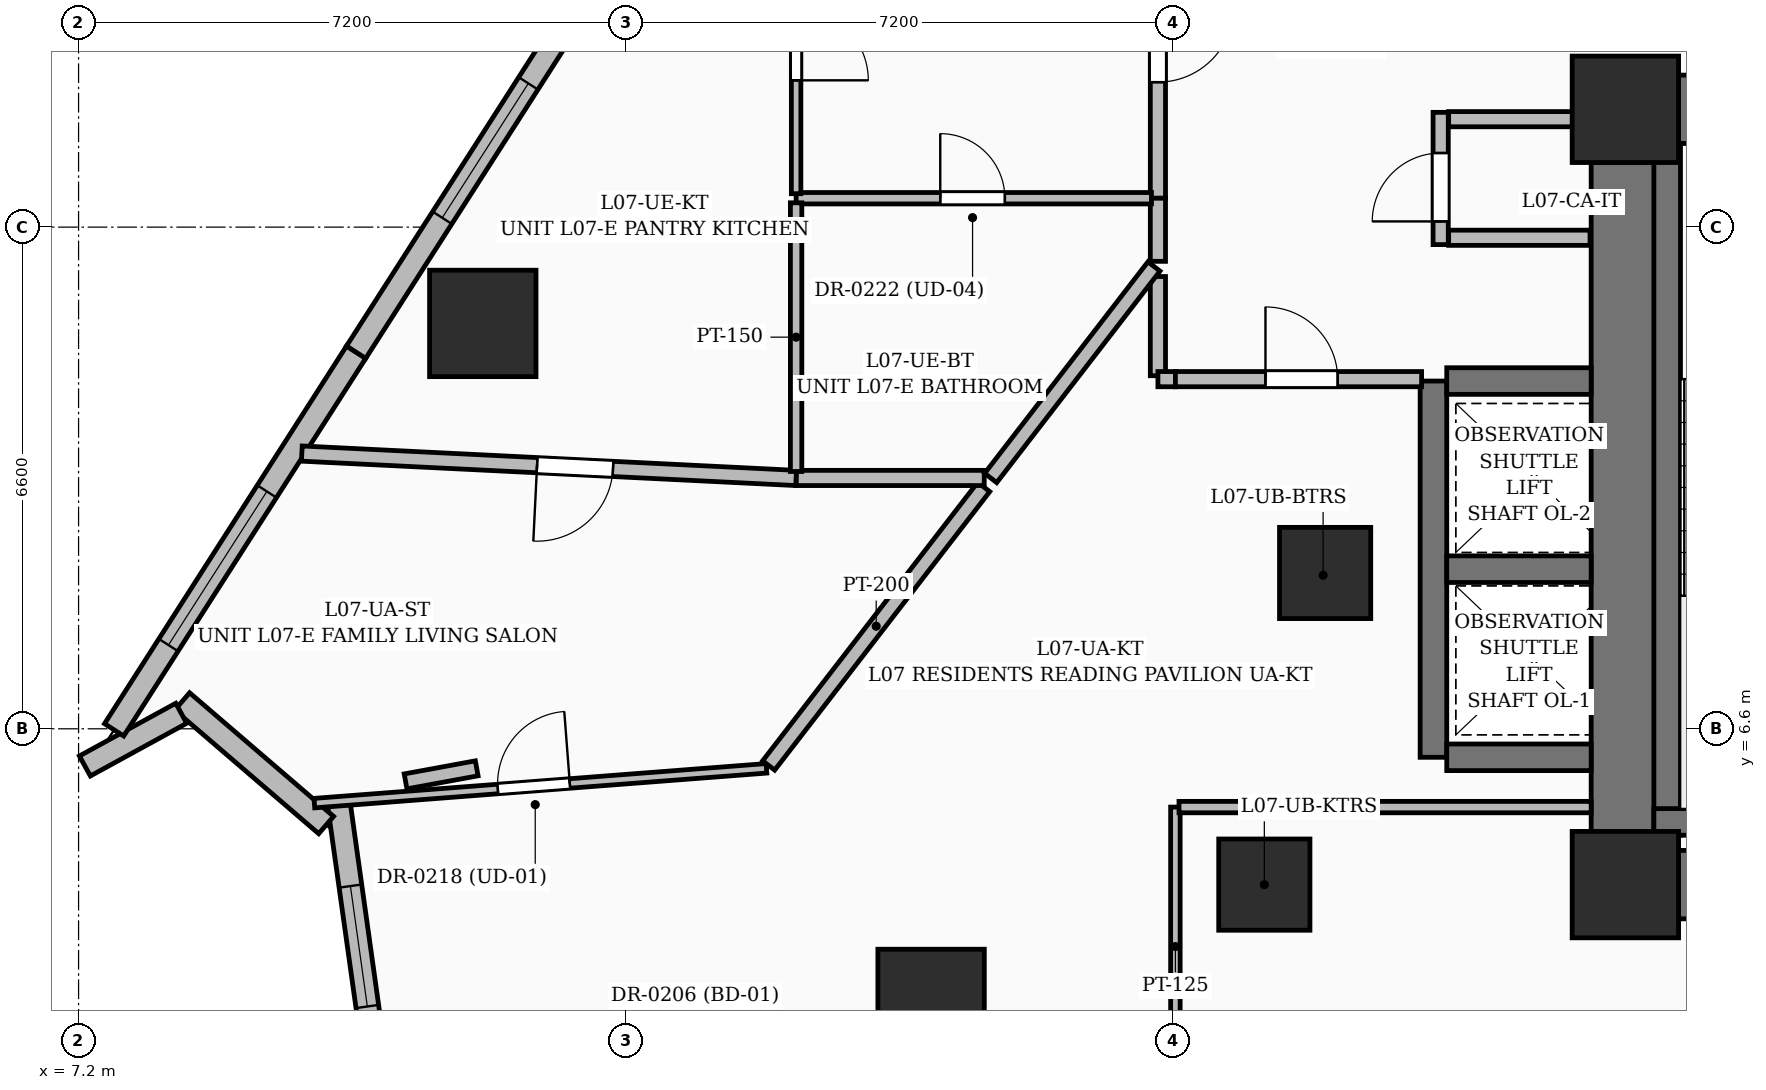
"""IFC4 building model, lengths in metres.
Left out: names, types, materials, properties, quantities, classifications, styles, units other than length and angle.
Written with IfcOpenShell. Run it as: python <this file> out.ifc"""

import sys

from ifc_helpers import new_model, si_unit, direction, frame, frame_2d, origin, origin_2d, place, context, subcontext, project, spatial, rectangle, extrude, element, fill, save


model = new_model("IFC4")
c1 = context("Model", 3, precision=1e-05, world=origin(), true_north=direction((0.0, 1.0)))
c2 = subcontext(c1, "Body", "Model", "MODEL_VIEW")
j1 = project(units=[si_unit("LENGTHUNIT", "METRE"), si_unit("PLANEANGLEUNIT", "RADIAN")], contexts=[c1])
p1 = place(None, origin())
s1 = spatial("IfcSite", under=j1, at=p1, CompositionType="ELEMENT")
p2 = place(p1, origin())
s2 = spatial("IfcBuilding", under=s1, at=p2, CompositionType="ELEMENT")
p3 = place(p2, frame((0.0, 0.0, 35.4)))
s3 = spatial("IfcBuildingStorey", under=s2, at=p3, CompositionType="ELEMENT", Elevation=35.4)
for number, where, z_axis, x_axis in (
    (1, (27.55, 4.55, 0.0), (0.0, 0.0, 1.0), (1.0, 0.0, 0.0)),
    (2, (27.55, 14.75, 0.0), (0.0, 0.0, 1.0), (1.0, 0.0, 0.0)),
):
    element("IfcColumn", number, at=place(p3, frame(where, z_axis=z_axis, x_axis=x_axis)), inside=s3, PredefinedType="COLUMN", context=c2, shape_type="SweptSolid", body=[
        extrude(rectangle(XDim=1.4, YDim=1.4, at=origin_2d()), origin(), (0.0, 0.0, 1.0), 3.6),
    ])
for number, where, z_axis, x_axis in (
    (3, (22.8, 4.55, 0.0), (0.0, 0.0, 1.0), (1.0, 0.0, 0.0)),
    (4, (23.6, 8.65, 0.0), (0.0, 0.0, 1.0), (1.0, 0.0, 0.0)),
):
    element("IfcColumn", number, at=place(p3, frame(where, z_axis=z_axis, x_axis=x_axis)), inside=s3, PredefinedType="COLUMN", context=c2, shape_type="SweptSolid", body=[
        extrude(rectangle(XDim=1.2, YDim=1.2, at=origin_2d()), origin(), (0.0, 0.0, 1.0), 3.6),
    ])
p4 = place(p3, frame((28.25, 4.55, 0.0), z_axis=(0.0, 0.0, 1.0), x_axis=(1.0, 0.0, 0.0)))
e5 = element("IfcWall", 5, at=p4, inside=s3, PredefinedType="SHEAR", context=c2, shape_type="SweptSolid", body=[
    extrude(rectangle(XDim=6.2, YDim=0.9, at=frame_2d((3.1, 0.0))), origin(), (0.0, 0.0, 1.0), 3.6),
])
p5 = place(p3, frame((28.25, 14.75, 0.0), z_axis=(0.0, 0.0, 1.0), x_axis=(1.0, 0.0, 0.0)))
e6 = element("IfcWall", 6, at=p5, inside=s3, PredefinedType="SHEAR", context=c2, shape_type="SweptSolid", body=[
    extrude(rectangle(XDim=6.2, YDim=0.9, at=frame_2d((3.1, 0.0))), origin(), (0.0, 0.0, 1.0), 3.6),
])
p6 = place(p5, frame((0.925, 0.0, 0.0)))
e7 = element("IfcOpeningElement", 7, at=p6, cuts=e6, PredefinedType="OPENING", context=c2, shape_type="SweptSolid", body=[
    extrude(rectangle(XDim=1.05, YDim=2.15, at=frame_2d((0.525, 1.075))), frame((0.0, 0.46, 0.0), z_axis=(0.0, -1.0, 0.0), x_axis=(1.0, 0.0, 0.0)), (0.0, 0.0, 1.0), 0.92),
])
p7 = place(p3, frame((27.55, 5.25, 0.0), z_axis=(0.0, 0.0, 1.0), x_axis=(0.0, 1.0, 0.0)))
e8 = element("IfcWall", 8, at=p7, inside=s3, PredefinedType="SHEAR", context=c2, shape_type="SweptSolid", body=[
    extrude(rectangle(XDim=8.8, YDim=0.9, at=frame_2d((4.4, 0.0))), origin(), (0.0, 0.0, 1.0), 3.6),
])
p8 = place(p3, frame((28.1, 5.2, 0.0), z_axis=(0.0, 0.0, 1.0), x_axis=(0.0, 1.0, 0.0)))
e9 = element("IfcWall", 9, at=p8, inside=s3, PredefinedType="SOLIDWALL", context=c2, shape_type="SweptSolid", body=[
    extrude(rectangle(XDim=9.1, YDim=0.35, at=frame_2d((4.55, 0.0))), origin(), (0.0, 0.0, 1.0), 3.6),
])
p9 = place(p3, frame((27.925, 5.375, 0.0), z_axis=(0.0, 0.0, 1.0), x_axis=(1.0, 0.0, 0.0)))
e10 = element("IfcWall", 10, at=p9, inside=s3, PredefinedType="SOLIDWALL", context=c2, shape_type="SweptSolid", body=[
    extrude(rectangle(XDim=3.55, YDim=0.35, at=frame_2d((1.775, 0.0))), origin(), (0.0, 0.0, 1.0), 3.6),
])
p10 = place(p3, frame((25.025, 6.225, 0.0), z_axis=(0.0, 0.0, 1.0), x_axis=(0.0, 1.0, 0.0)))
e11 = element("IfcWall", 11, at=p10, inside=s3, PredefinedType="SOLIDWALL", context=c2, shape_type="SweptSolid", body=[
    extrude(rectangle(XDim=4.95, YDim=0.35, at=frame_2d((2.475, 0.0))), origin(), (0.0, 0.0, 1.0), 3.6),
])
for number, where, z_axis, x_axis in (
    (12, (25.2, 6.225, 0.0), (0.0, 0.0, 1.0), (1.0, 0.0, 0.0)),
    (13, (25.2, 8.7, 0.0), (0.0, 0.0, 1.0), (1.0, 0.0, 0.0)),
    (14, (25.2, 11.175, 0.0), (0.0, 0.0, 1.0), (1.0, 0.0, 0.0)),
):
    element("IfcWall", number, at=place(p3, frame(where, z_axis=z_axis, x_axis=x_axis)), inside=s3, PredefinedType="SOLIDWALL", context=c2, shape_type="SweptSolid", body=[
        extrude(rectangle(XDim=1.9, YDim=0.35, at=frame_2d((0.95, 0.0))), origin(), (0.0, 0.0, 1.0), 3.6),
    ])
for number, where, z_axis, x_axis in (
    (15, (18.416, 3.0, 0.0), (0.0, 0.0, 1.0), (1.0, 0.0, 0.0)),
    (16, (12.518, 11.933, 0.0), (0.0, 0.0, 1.0), (1.0, 0.0, 0.0)),
):
    element("IfcColumn", number, at=place(p3, frame(where, z_axis=z_axis, x_axis=x_axis)), inside=s3, PredefinedType="COLUMN", context=c2, shape_type="SweptSolid", body=[
        extrude(rectangle(XDim=1.4, YDim=1.4, at=origin_2d()), origin(), (0.0, 0.0, 1.0), 3.6),
    ])
p11 = place(p3, frame((11.044, 2.625, 0.0), z_axis=(0.0, 0.0, 1.0), x_axis=(-0.139123594989, 0.99027502509, 0.0)))
e17 = element("IfcWall", 17, at=p11, inside=s3, PredefinedType="SOLIDWALL", context=c2, shape_type="SweptSolid", body=[
    extrude(rectangle(XDim=3.05, YDim=0.3, at=frame_2d((1.525, 0.0))), origin(), (0.0, 0.0, 1.0), 3.35),
])
p12 = place(p11, frame((0.325, 0.0, 0.55)))
e18 = element("IfcOpeningElement", 18, at=p12, cuts=e17, PredefinedType="OPENING", context=c2, shape_type="SweptSolid", body=[
    extrude(rectangle(XDim=1.6, YDim=2.2, at=frame_2d((0.8, 1.1))), frame((0.0, 0.16, 0.0), z_axis=(0.0, -1.0, 0.0), x_axis=(1.0, 0.0, 0.0)), (0.0, 0.0, 1.0), 0.32),
])
p13 = place(p3, frame((10.457, 5.334, 0.0), z_axis=(0.0, 0.0, 1.0), x_axis=(-0.758710972352, 0.651427402273, 0.0)))
e19 = element("IfcWall", 19, at=p13, inside=s3, PredefinedType="SOLIDWALL", context=c2, shape_type="SweptSolid", body=[
    extrude(rectangle(XDim=2.496, YDim=0.3, at=frame_2d((1.248, 0.0))), origin(), (0.0, 0.0, 1.0), 3.35),
])
p14 = place(p3, frame((8.551, 6.804, 0.0), z_axis=(0.0, 0.0, 1.0), x_axis=(-0.877287752989, -0.479964788767, 0.0)))
e20 = element("IfcWall", 20, at=p14, inside=s3, PredefinedType="SOLIDWALL", context=c2, shape_type="SweptSolid", body=[
    extrude(rectangle(XDim=1.445, YDim=0.3, at=frame_2d((0.722, 0.0))), origin(), (0.0, 0.0, 1.0), 3.35),
])
p15 = place(p3, frame((7.668, 6.586, 0.0), z_axis=(0.0, 0.0, 1.0), x_axis=(0.539504449159, 0.841982748836, 0.0)))
e21 = element("IfcWall", 21, at=p15, inside=s3, PredefinedType="SOLIDWALL", context=c2, shape_type="SweptSolid", body=[
    extrude(rectangle(XDim=5.901, YDim=0.3, at=frame_2d((2.95, 0.0))), origin(), (0.0, 0.0, 1.0), 3.35),
])
p16 = place(p15, frame((1.325, 0.0, 0.6)))
e22 = element("IfcOpeningElement", 22, at=p16, cuts=e21, PredefinedType="OPENING", context=c2, shape_type="SweptSolid", body=[
    extrude(rectangle(XDim=2.4, YDim=2.1, at=frame_2d((1.2, 1.05))), frame((0.0, 0.16, 0.0), z_axis=(0.0, -1.0, 0.0), x_axis=(1.0, 0.0, 0.0)), (0.0, 0.0, 1.0), 0.32),
])
p17 = place(p3, frame((10.851, 11.555, 0.0), z_axis=(0.0, 0.0, 1.0), x_axis=(0.539526045631, 0.841968910403, 0.0)))
e23 = element("IfcWall", 23, at=p17, inside=s3, PredefinedType="SOLIDWALL", context=c2, shape_type="SweptSolid", body=[
    extrude(rectangle(XDim=6.526, YDim=0.3, at=frame_2d((3.263, 0.0))), origin(), (0.0, 0.0, 1.0), 3.35),
])
p18 = place(p17, frame((2.1, 0.0, 0.55)))
e24 = element("IfcOpeningElement", 24, at=p18, cuts=e23, PredefinedType="OPENING", context=c2, shape_type="SweptSolid", body=[
    extrude(rectangle(XDim=2.1, YDim=2.4, at=frame_2d((1.05, 1.2))), frame((0.0, 0.16, 0.0), z_axis=(0.0, -1.0, 0.0), x_axis=(1.0, 0.0, 0.0)), (0.0, 0.0, 1.0), 0.32),
])
p19 = place(p3, frame((25.12, 12.97, 0.0), z_axis=(0.0, 0.0, 1.0), x_axis=(0.0, 1.0, 0.0)))
e25 = element("IfcWall", 25, at=p19, inside=s3, PredefinedType="PARTITIONING", context=c2, shape_type="SweptSolid", body=[
    extrude(rectangle(XDim=1.74, YDim=0.2, at=frame_2d((0.87, 0.0))), origin(), (0.0, 0.0, 1.0), 3.35),
])
p20 = place(p19, frame((0.305, 0.0, 0.0)))
e26 = element("IfcOpeningElement", 26, at=p20, cuts=e25, PredefinedType="OPENING", context=c2, shape_type="SweptSolid", body=[
    extrude(rectangle(XDim=0.9, YDim=2.1, at=frame_2d((0.45, 1.05))), frame((0.0, 0.11, 0.0), z_axis=(0.0, -1.0, 0.0), x_axis=(1.0, 0.0, 0.0)), (0.0, 0.0, 1.0), 0.22),
])
for number, where, z_axis, x_axis in (
    (27, (25.225, 14.62, 0.0), (0.0, 0.0, 1.0), (1.0, 0.0, 0.0)),
    (28, (25.225, 13.06, 0.0), (0.0, 0.0, 1.0), (1.0, 0.0, 0.0)),
):
    element("IfcWall", number, at=place(p3, frame(where, z_axis=z_axis, x_axis=x_axis)), inside=s3, PredefinedType="PARTITIONING", context=c2, shape_type="SweptSolid", body=[
        extrude(rectangle(XDim=1.86, YDim=0.2, at=frame_2d((0.93, 0.0))), origin(), (0.0, 0.0, 1.0), 3.35),
    ])
p21 = place(p3, frame((21.4, 12.55, 0.0), z_axis=(0.0, 0.0, 1.0), x_axis=(0.0, -1.0, 0.0)))
e29 = element("IfcWall", 29, at=p21, inside=s3, PredefinedType="PARTITIONING", context=c2, shape_type="SweptSolid", body=[
    extrude(rectangle(XDim=1.305, YDim=0.2, at=frame_2d((0.652, 0.0))), origin(), (0.0, 0.0, 1.0), 3.35),
])
p22 = place(p3, frame((21.4, 11.2, 0.0), z_axis=(0.0, 0.0, 1.0), x_axis=(1.0, 0.0, 0.0)))
e30 = element("IfcWall", 30, at=p22, inside=s3, PredefinedType="PARTITIONING", context=c2, shape_type="SweptSolid", body=[
    extrude(rectangle(XDim=0.23, YDim=0.2, at=frame_2d((0.115, 0.0))), origin(), (0.0, 0.0, 1.0), 2.712),
])
p23 = place(p3, frame((21.63, 11.2, 0.0), z_axis=(0.0, 0.0, 1.0), x_axis=(1.0, 0.0, 0.0)))
e31 = element("IfcWall", 31, at=p23, inside=s3, PredefinedType="PARTITIONING", context=c2, shape_type="SweptSolid", body=[
    extrude(rectangle(XDim=3.239, YDim=0.2, at=frame_2d((1.62, 0.0))), origin(), (0.0, 0.0, 1.0), 2.712),
])
p24 = place(p23, frame((1.185, 0.0, 0.0)))
e32 = element("IfcOpeningElement", 32, at=p24, cuts=e31, PredefinedType="OPENING", context=c2, shape_type="SweptSolid", body=[
    extrude(rectangle(XDim=0.95, YDim=2.2, at=frame_2d((0.475, 1.1))), frame((0.0, 0.11, 0.0), z_axis=(0.0, -1.0, 0.0), x_axis=(1.0, 0.0, 0.0)), (0.0, 0.0, 1.0), 0.22),
])
p25 = place(p3, frame((21.4, 17.75, 0.0), z_axis=(0.0, 0.0, 1.0), x_axis=(0.0, -1.0, 0.0)))
e33 = element("IfcWall", 33, at=p25, inside=s3, PredefinedType="PARTITIONING", context=c2, shape_type="SweptSolid", body=[
    extrude(rectangle(XDim=4.17, YDim=0.2, at=frame_2d((2.085, 0.0))), origin(), (0.0, 0.0, 1.0), 2.712),
])
p26 = place(p25, frame((1.643, 0.0, 0.0)))
e34 = element("IfcOpeningElement", 34, at=p26, cuts=e33, PredefinedType="OPENING", context=c2, shape_type="SweptSolid", body=[
    extrude(rectangle(XDim=1.0, YDim=2.2, at=frame_2d((0.5, 1.1))), frame((0.0, 0.11, 0.0), z_axis=(0.0, -1.0, 0.0), x_axis=(1.0, 0.0, 0.0)), (0.0, 0.0, 1.0), 0.22),
])
p27 = place(p3, frame((21.4, 13.58, 0.0), z_axis=(0.0, 0.0, 1.0), x_axis=(0.0, -1.0, 0.0)))
e35 = element("IfcWall", 35, at=p27, inside=s3, PredefinedType="PARTITIONING", context=c2, shape_type="SweptSolid", body=[
    extrude(rectangle(XDim=0.83, YDim=0.2, at=frame_2d((0.415, 0.0))), origin(), (0.0, 0.0, 1.0), 3.35),
])
p28 = place(p3, frame((10.302, 5.622, 0.0), z_axis=(0.0, 0.0, 1.0), x_axis=(0.997048464094, 0.076774737046, 0.0)))
e36 = element("IfcWall", 36, at=p28, inside=s3, PredefinedType="PARTITIONING", context=c2, shape_type="SweptSolid", body=[
    extrude(rectangle(XDim=5.966, YDim=0.125, at=frame_2d((2.983, 0.0))), origin(), (0.0, 0.0, 1.0), 2.37),
])
p29 = place(p28, frame((2.421, 0.0, 0.0)))
e37 = element("IfcOpeningElement", 37, at=p29, cuts=e36, PredefinedType="OPENING", context=c2, shape_type="SweptSolid", body=[
    extrude(rectangle(XDim=0.95, YDim=2.2, at=frame_2d((0.475, 1.1))), frame((0.0, 0.072, 0.0), z_axis=(0.0, -1.0, 0.0), x_axis=(1.0, 0.0, 0.0)), (0.0, 0.0, 1.0), 0.145),
])
p30 = place(p3, frame((16.279, 6.118, 0.0), z_axis=(0.0, 0.0, 1.0), x_axis=(0.611231323246, 0.791452000745, 0.0)))
e38 = element("IfcWall", 38, at=p30, inside=s3, PredefinedType="PARTITIONING", context=c2, shape_type="SweptSolid", body=[
    extrude(rectangle(XDim=4.629, YDim=0.2, at=frame_2d((2.314, 0.0))), origin(), (0.0, 0.0, 1.0), 2.228),
])
p31 = place(p3, frame((19.115, 9.9, 0.0), z_axis=(0.0, 0.0, 1.0), x_axis=(-1.0, 0.0, 0.0)))
e39 = element("IfcWall", 39, at=p31, inside=s3, PredefinedType="PARTITIONING", context=c2, shape_type="SweptSolid", body=[
    extrude(rectangle(XDim=2.475, YDim=0.2, at=frame_2d((1.238, 0.0))), origin(), (0.0, 0.0, 1.0), 2.228),
])
p32 = place(p3, frame((16.64, 9.9, 0.0), z_axis=(0.0, 0.0, 1.0), x_axis=(-0.998783560552, 0.049309219933, 0.0)))
e40 = element("IfcWall", 40, at=p32, inside=s3, PredefinedType="PARTITIONING", context=c2, shape_type="SweptSolid", body=[
    extrude(rectangle(XDim=6.511, YDim=0.2, at=frame_2d((3.255, 0.0))), origin(), (0.0, 0.0, 1.0), 2.37),
])
p33 = place(p32, frame((2.412, 0.0, 0.0)))
e41 = element("IfcOpeningElement", 41, at=p33, cuts=e40, PredefinedType="OPENING", context=c2, shape_type="SweptSolid", body=[
    extrude(rectangle(XDim=1.0, YDim=2.2, at=frame_2d((0.5, 1.1))), frame((0.0, 0.11, 0.0), z_axis=(0.0, -1.0, 0.0), x_axis=(1.0, 0.0, 0.0)), (0.0, 0.0, 1.0), 0.22),
])
p34 = place(p3, frame((21.63, 1.9, 0.0), z_axis=(0.0, 0.0, 1.0), x_axis=(0.0, 1.0, 0.0)))
e42 = element("IfcWall", 42, at=p34, inside=s3, PredefinedType="PARTITIONING", context=c2, shape_type="SweptSolid", body=[
    extrude(rectangle(XDim=3.67, YDim=0.125, at=frame_2d((1.835, 0.0))), origin(), (0.0, 0.0, 1.0), 2.228),
])
p35 = place(p3, frame((21.348, 12.683, 0.0), z_axis=(0.0, 0.0, 1.0), x_axis=(-0.611075844668, -0.791572051088, 0.0)))
e43 = element("IfcWall", 43, at=p35, inside=s3, PredefinedType="PARTITIONING", context=c2, shape_type="SweptSolid", body=[
    extrude(rectangle(XDim=3.515, YDim=0.2, at=frame_2d((1.758, 0.0))), origin(), (0.0, 0.0, 1.0), 2.228),
])
p36 = place(p3, frame((21.677, 5.57, 0.0), z_axis=(0.0, 0.0, 1.0), x_axis=(1.0, 0.0, 0.0)))
e44 = element("IfcWall", 44, at=p36, inside=s3, PredefinedType="PARTITIONING", context=c2, shape_type="SweptSolid", body=[
    extrude(rectangle(XDim=0.903, YDim=0.15, at=frame_2d((0.451, 0.0))), origin(), (0.0, 0.0, 1.0), 3.35),
])
p37 = place(p3, frame((23.02, 5.57, 0.0), z_axis=(0.0, 0.0, 1.0), x_axis=(1.0, 0.0, 0.0)))
e45 = element("IfcWall", 45, at=p37, inside=s3, PredefinedType="PARTITIONING", context=c2, shape_type="SweptSolid", body=[
    extrude(rectangle(XDim=4.08, YDim=0.15, at=frame_2d((2.04, 0.0))), origin(), (0.0, 0.0, 1.0), 3.35),
])
p38 = place(p3, frame((16.64, 13.58, 0.0), z_axis=(0.0, 0.0, 1.0), x_axis=(1.0, 0.0, 0.0)))
e46 = element("IfcWall", 46, at=p38, inside=s3, PredefinedType="PARTITIONING", context=c2, shape_type="SweptSolid", body=[
    extrude(rectangle(XDim=4.675, YDim=0.15, at=frame_2d((2.337, 0.0))), origin(), (0.0, 0.0, 1.0), 2.712),
])
p39 = place(p38, frame((1.896, 0.0, 0.0)))
e47 = element("IfcOpeningElement", 47, at=p39, cuts=e46, PredefinedType="OPENING", context=c2, shape_type="SweptSolid", body=[
    extrude(rectangle(XDim=0.85, YDim=2.1, at=frame_2d((0.425, 1.05))), frame((0.0, 0.085, 0.0), z_axis=(0.0, -1.0, 0.0), x_axis=(1.0, 0.0, 0.0)), (0.0, 0.0, 1.0), 0.17),
])
p40 = place(p3, frame((16.64, 17.75, 0.0), z_axis=(0.0, 0.0, 1.0), x_axis=(0.0, -1.0, 0.0)))
e48 = element("IfcWall", 48, at=p40, inside=s3, PredefinedType="PARTITIONING", context=c2, shape_type="SweptSolid", body=[
    extrude(rectangle(XDim=4.11, YDim=0.125, at=frame_2d((2.055, 0.0))), origin(), (0.0, 0.0, 1.0), 3.35),
])
p41 = place(p40, frame((1.669, 0.0, 0.0)))
e49 = element("IfcOpeningElement", 49, at=p41, cuts=e48, PredefinedType="OPENING", context=c2, shape_type="SweptSolid", body=[
    extrude(rectangle(XDim=0.95, YDim=2.2, at=frame_2d((0.475, 1.1))), frame((0.0, 0.072, 0.0), z_axis=(0.0, -1.0, 0.0), x_axis=(1.0, 0.0, 0.0)), (0.0, 0.0, 1.0), 0.145),
])
p42 = place(p3, frame((16.64, 13.52, 0.0), z_axis=(0.0, 0.0, 1.0), x_axis=(0.0, -1.0, 0.0)))
e50 = element("IfcWall", 50, at=p42, inside=s3, PredefinedType="PARTITIONING", context=c2, shape_type="SweptSolid", body=[
    extrude(rectangle(XDim=3.535, YDim=0.15, at=frame_2d((1.768, 0.0))), origin(), (0.0, 0.0, 1.0), 2.228),
])
p43 = place(p3, frame((11.502, 5.908, 0.0), z_axis=(0.0, 0.0, 1.0), x_axis=(0.983510869315, 0.180849025265, 0.0)))
e51 = element("IfcWall", 51, at=p43, inside=s3, PredefinedType="PARTITIONING", context=c2, shape_type="SweptSolid", body=[
    extrude(rectangle(XDim=0.952, YDim=0.2, at=frame_2d((0.476, 0.0))), origin(), (0.0, 0.0, 1.0), 3.35),
])
p44 = place(p12, origin())
e52 = element("IfcWindow", 52, at=p44, inside=s3, PartitioningType="SINGLE_PANEL", PredefinedType="WINDOW", context=c2, shape_type="SweptSolid", body=[
    extrude(rectangle(XDim=1.6, YDim=2.2, at=frame_2d((0.8, 1.1))), frame((0.0, 0.03, 0.0), z_axis=(0.0, -1.0, 0.0), x_axis=(1.0, 0.0, 0.0)), (0.0, 0.0, 1.0), 0.06),
])
fill(e18, e52)
p45 = place(p16, origin())
e53 = element("IfcWindow", 53, at=p45, inside=s3, PartitioningType="SINGLE_PANEL", PredefinedType="WINDOW", context=c2, shape_type="SweptSolid", body=[
    extrude(rectangle(XDim=2.4, YDim=2.1, at=frame_2d((1.2, 1.05))), frame((0.0, 0.03, 0.0), z_axis=(0.0, -1.0, 0.0), x_axis=(1.0, 0.0, 0.0)), (0.0, 0.0, 1.0), 0.06),
])
fill(e22, e53)
p46 = place(p18, origin())
e54 = element("IfcWindow", 54, at=p46, inside=s3, PartitioningType="SINGLE_PANEL", PredefinedType="WINDOW", context=c2, shape_type="SweptSolid", body=[
    extrude(rectangle(XDim=2.1, YDim=2.4, at=frame_2d((1.05, 1.2))), frame((0.0, 0.03, 0.0), z_axis=(0.0, -1.0, 0.0), x_axis=(1.0, 0.0, 0.0)), (0.0, 0.0, 1.0), 0.06),
])
fill(e24, e54)
p47 = place(p20, origin())
e55 = element("IfcDoor", 55, at=p47, inside=s3, OperationType="SINGLE_SWING_LEFT", PredefinedType="DOOR", context=c2, shape_type="SweptSolid", body=[
    extrude(rectangle(XDim=0.9, YDim=2.1, at=frame_2d((0.45, 1.05))), frame((0.0, 0.025, 0.0), z_axis=(0.0, -1.0, 0.0), x_axis=(1.0, 0.0, 0.0)), (0.0, 0.0, 1.0), 0.05),
])
fill(e26, e55)
p48 = place(p29, origin())
e56 = element("IfcDoor", 56, at=p48, inside=s3, OperationType="SINGLE_SWING_RIGHT", PredefinedType="DOOR", context=c2, shape_type="SweptSolid", body=[
    extrude(rectangle(XDim=0.95, YDim=2.2, at=frame_2d((0.475, 1.1))), frame((0.0, 0.025, 0.0), z_axis=(0.0, -1.0, 0.0), x_axis=(1.0, 0.0, 0.0)), (0.0, 0.0, 1.0), 0.05),
])
fill(e37, e56)
p49 = place(p26, origin())
e57 = element("IfcDoor", 57, at=p49, inside=s3, OperationType="SINGLE_SWING_LEFT", PredefinedType="DOOR", context=c2, shape_type="SweptSolid", body=[
    extrude(rectangle(XDim=1.0, YDim=2.2, at=frame_2d((0.5, 1.1))), frame((0.0, 0.025, 0.0), z_axis=(0.0, -1.0, 0.0), x_axis=(1.0, 0.0, 0.0)), (0.0, 0.0, 1.0), 0.05),
])
fill(e34, e57)
p50 = place(p41, origin())
e58 = element("IfcDoor", 58, at=p50, inside=s3, OperationType="SINGLE_SWING_RIGHT", PredefinedType="DOOR", context=c2, shape_type="SweptSolid", body=[
    extrude(rectangle(XDim=0.95, YDim=2.2, at=frame_2d((0.475, 1.1))), frame((0.0, 0.025, 0.0), z_axis=(0.0, -1.0, 0.0), x_axis=(1.0, 0.0, 0.0)), (0.0, 0.0, 1.0), 0.05),
])
fill(e49, e58)
p51 = place(p39, origin())
e59 = element("IfcDoor", 59, at=p51, inside=s3, OperationType="SINGLE_SWING_LEFT", PredefinedType="DOOR", context=c2, shape_type="SweptSolid", body=[
    extrude(rectangle(XDim=0.85, YDim=2.1, at=frame_2d((0.425, 1.05))), frame((0.0, 0.025, 0.0), z_axis=(0.0, -1.0, 0.0), x_axis=(1.0, 0.0, 0.0)), (0.0, 0.0, 1.0), 0.05),
])
fill(e47, e59)
p52 = place(p33, origin())
e60 = element("IfcDoor", 60, at=p52, inside=s3, OperationType="SINGLE_SWING_RIGHT", PredefinedType="DOOR", context=c2, shape_type="SweptSolid", body=[
    extrude(rectangle(XDim=1.0, YDim=2.2, at=frame_2d((0.5, 1.1))), frame((0.0, 0.025, 0.0), z_axis=(0.0, -1.0, 0.0), x_axis=(1.0, 0.0, 0.0)), (0.0, 0.0, 1.0), 0.05),
])
fill(e41, e60)
p53 = place(p24, origin())
e61 = element("IfcDoor", 61, at=p53, inside=s3, OperationType="SINGLE_SWING_LEFT", PredefinedType="DOOR", context=c2, shape_type="SweptSolid", body=[
    extrude(rectangle(XDim=0.95, YDim=2.2, at=frame_2d((0.475, 1.1))), frame((0.0, 0.025, 0.0), z_axis=(0.0, -1.0, 0.0), x_axis=(1.0, 0.0, 0.0)), (0.0, 0.0, 1.0), 0.05),
])
fill(e32, e61)
save(model, sys.argv[1])
